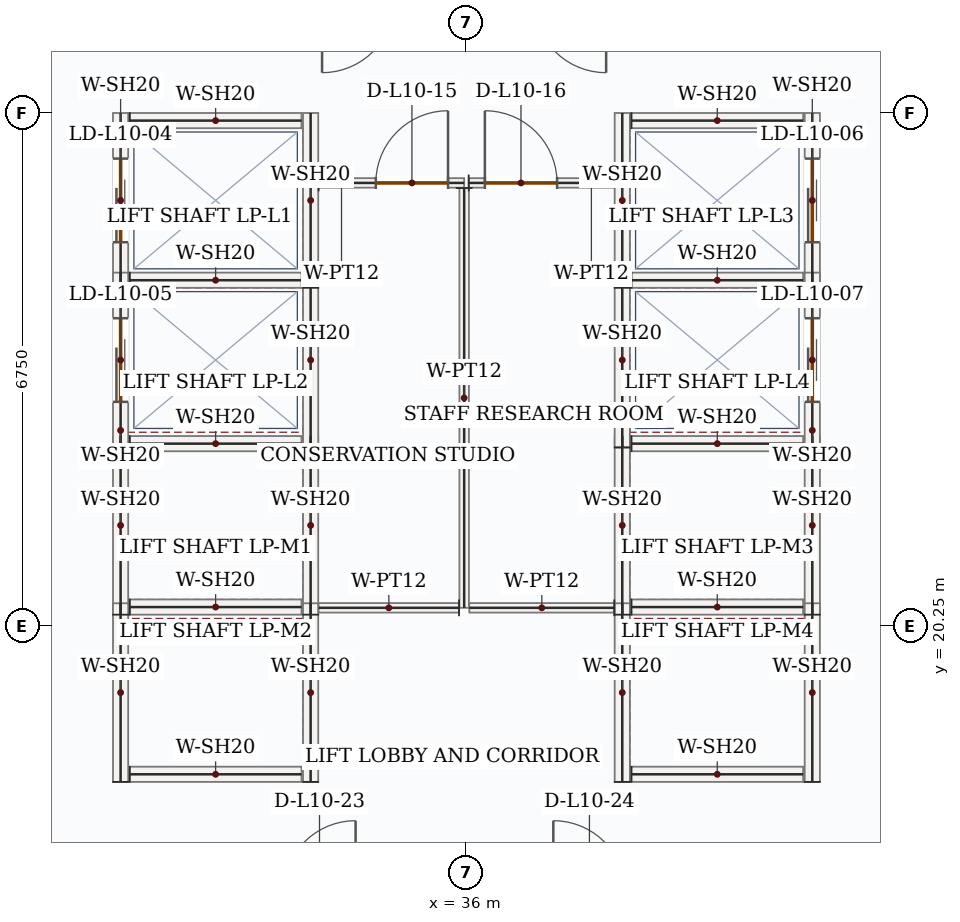
"""IFC4 building model, lengths in metres.
Left out: names, types, materials, properties, quantities, classifications, styles, units other than length and angle.
Written with IfcOpenShell. Run it as: python <this file> out.ifc"""

import sys

from ifc_helpers import new_model, si_unit, direction, frame, frame_2d, origin, place, context, subcontext, project, spatial, rectangle, extrude, source, transform, mapped, element, fill, save


model = new_model("IFC4")
c1 = context("Model", 3, precision=1e-05, world=origin(), true_north=direction((0.0, 1.0)))
c2 = subcontext(c1, "Body", "Model", "MODEL_VIEW")
j1 = project(units=[si_unit("LENGTHUNIT", "METRE"), si_unit("PLANEANGLEUNIT", "RADIAN")], contexts=[c1])
p1 = place(None, origin())
s1 = spatial("IfcSite", under=j1, at=p1, CompositionType="ELEMENT")
p2 = place(p1, origin())
s2 = spatial("IfcBuilding", under=s1, at=p2, CompositionType="ELEMENT")
p3 = place(p2, frame((0.0, 0.0, 50.1)))
s3 = spatial("IfcBuildingStorey", under=s2, at=p3, CompositionType="ELEMENT", Elevation=50.1)
m1 = source(origin(), c2, "Body", "SweptSolid", [
    extrude(rectangle(XDim=2.35, YDim=0.2, at=frame_2d((1.175, 0.0))), origin(), (0.0, 0.0, 1.0), 3.95),
])
for number, where, z_axis, x_axis in (
    (1, (31.45, 20.4, 0.0), (0.0, 0.0, 1.0), (0.0, 1.0, 0.0)),
    (2, (33.95, 20.4, 0.0), (0.0, 0.0, 1.0), (0.0, 1.0, 0.0)),
):
    element("IfcWall", number, at=place(p3, frame(where, z_axis=z_axis, x_axis=x_axis)), inside=s3, PredefinedType="SOLIDWALL", context=c2, shape_type="MappedRepresentation", body=[
        mapped(m1, transform((0.0, 0.0, 0.0), x_axis=(1.0, 0.0, 0.0), y_axis=(0.0, 1.0, 0.0), z_axis=(0.0, 0.0, 1.0), scale=1.0)),
    ])
m2 = source(origin(), c2, "Body", "SweptSolid", [
    extrude(rectangle(XDim=2.26, YDim=0.2, at=frame_2d((1.13, 0.0))), origin(), (0.0, 0.0, 1.0), 3.95),
])
for number, where, z_axis, x_axis in (
    (3, (31.57, 20.5, 0.0), (0.0, 0.0, 1.0), (1.0, 0.0, 0.0)),
    (4, (31.57, 22.65, 0.0), (0.0, 0.0, 1.0), (1.0, 0.0, 0.0)),
):
    element("IfcWall", number, at=place(p3, frame(where, z_axis=z_axis, x_axis=x_axis)), inside=s3, PredefinedType="SOLIDWALL", context=c2, shape_type="MappedRepresentation", body=[
        mapped(m2, transform((0.0, 0.0, 0.0), x_axis=(1.0, 0.0, 0.0), y_axis=(0.0, 1.0, 0.0), z_axis=(0.0, 0.0, 1.0), scale=1.0)),
    ])
for number, where, z_axis, x_axis in (
    (5, (31.45, 18.2, 0.0), (0.0, 0.0, 1.0), (0.0, 1.0, 0.0)),
    (6, (33.95, 18.2, 0.0), (0.0, 0.0, 1.0), (0.0, 1.0, 0.0)),
):
    element("IfcWall", number, at=place(p3, frame(where, z_axis=z_axis, x_axis=x_axis)), inside=s3, PredefinedType="SOLIDWALL", context=c2, shape_type="MappedRepresentation", body=[
        mapped(m1, transform((0.0, 0.0, 0.0), x_axis=(1.0, 0.0, 0.0), y_axis=(0.0, 1.0, 0.0), z_axis=(0.0, 0.0, 1.0), scale=1.0)),
    ])
p4 = place(p3, frame((31.57, 18.3, 0.0), z_axis=(0.0, 0.0, 1.0), x_axis=(1.0, 0.0, 0.0)))
e7 = element("IfcWall", 7, at=p4, inside=s3, PredefinedType="SOLIDWALL", context=c2, shape_type="MappedRepresentation", body=[
    mapped(m2, transform((0.0, 0.0, 0.0), x_axis=(1.0, 0.0, 0.0), y_axis=(0.0, 1.0, 0.0), z_axis=(0.0, 0.0, 1.0), scale=1.0)),
])
for number, where, z_axis, x_axis in (
    (8, (38.05, 20.4, 0.0), (0.0, 0.0, 1.0), (0.0, 1.0, 0.0)),
    (9, (40.55, 20.4, 0.0), (0.0, 0.0, 1.0), (0.0, 1.0, 0.0)),
):
    element("IfcWall", number, at=place(p3, frame(where, z_axis=z_axis, x_axis=x_axis)), inside=s3, PredefinedType="SOLIDWALL", context=c2, shape_type="MappedRepresentation", body=[
        mapped(m1, transform((0.0, 0.0, 0.0), x_axis=(1.0, 0.0, 0.0), y_axis=(0.0, 1.0, 0.0), z_axis=(0.0, 0.0, 1.0), scale=1.0)),
    ])
for number, where, z_axis, x_axis in (
    (10, (38.17, 20.5, 0.0), (0.0, 0.0, 1.0), (1.0, 0.0, 0.0)),
    (11, (38.17, 22.65, 0.0), (0.0, 0.0, 1.0), (1.0, 0.0, 0.0)),
):
    element("IfcWall", number, at=place(p3, frame(where, z_axis=z_axis, x_axis=x_axis)), inside=s3, PredefinedType="SOLIDWALL", context=c2, shape_type="MappedRepresentation", body=[
        mapped(m2, transform((0.0, 0.0, 0.0), x_axis=(1.0, 0.0, 0.0), y_axis=(0.0, 1.0, 0.0), z_axis=(0.0, 0.0, 1.0), scale=1.0)),
    ])
for number, where, z_axis, x_axis in (
    (12, (38.05, 18.2, 0.0), (0.0, 0.0, 1.0), (0.0, 1.0, 0.0)),
    (13, (40.55, 18.2, 0.0), (0.0, 0.0, 1.0), (0.0, 1.0, 0.0)),
):
    element("IfcWall", number, at=place(p3, frame(where, z_axis=z_axis, x_axis=x_axis)), inside=s3, PredefinedType="SOLIDWALL", context=c2, shape_type="MappedRepresentation", body=[
        mapped(m1, transform((0.0, 0.0, 0.0), x_axis=(1.0, 0.0, 0.0), y_axis=(0.0, 1.0, 0.0), z_axis=(0.0, 0.0, 1.0), scale=1.0)),
    ])
p5 = place(p3, frame((38.17, 18.3, 0.0), z_axis=(0.0, 0.0, 1.0), x_axis=(1.0, 0.0, 0.0)))
e14 = element("IfcWall", 14, at=p5, inside=s3, PredefinedType="SOLIDWALL", context=c2, shape_type="MappedRepresentation", body=[
    mapped(m2, transform((0.0, 0.0, 0.0), x_axis=(1.0, 0.0, 0.0), y_axis=(0.0, 1.0, 0.0), z_axis=(0.0, 0.0, 1.0), scale=1.0)),
])
p6 = place(p3, frame((31.45, 24.7, 0.0), z_axis=(0.0, 0.0, 1.0), x_axis=(0.0, 1.0, 0.0)))
e15 = element("IfcWall", 15, at=p6, inside=s3, PredefinedType="SOLIDWALL", context=c2, shape_type="SweptSolid", body=[
    extrude(rectangle(XDim=2.3, YDim=0.2, at=frame_2d((1.15, 0.0))), origin(), (0.0, 0.0, 1.0), 3.95),
])
p7 = place(p6, frame((0.6, 0.0, 0.0)))
e16 = element("IfcOpeningElement", 16, at=p7, cuts=e15, PredefinedType="OPENING", context=c2, shape_type="SweptSolid", body=[
    extrude(rectangle(XDim=1.1, YDim=2.15, at=frame_2d((0.55, 1.075))), frame((0.0, 0.11, 0.0), z_axis=(0.0, -1.0, 0.0), x_axis=(1.0, 0.0, 0.0)), (0.0, 0.0, 1.0), 0.22),
])
m3 = source(origin(), c2, "Body", "SweptSolid", [
    extrude(rectangle(XDim=2.3, YDim=0.2, at=frame_2d((1.15, 0.0))), origin(), (0.0, 0.0, 1.0), 3.95),
])
p8 = place(p3, frame((33.95, 24.7, 0.0), z_axis=(0.0, 0.0, 1.0), x_axis=(0.0, 1.0, 0.0)))
e17 = element("IfcWall", 17, at=p8, inside=s3, PredefinedType="SOLIDWALL", context=c2, shape_type="MappedRepresentation", body=[
    mapped(m3, transform((0.0, 0.0, 0.0), x_axis=(1.0, 0.0, 0.0), y_axis=(0.0, 1.0, 0.0), z_axis=(0.0, 0.0, 1.0), scale=1.0)),
])
for number, where, z_axis, x_axis in (
    (18, (31.57, 24.8, 0.0), (0.0, 0.0, 1.0), (1.0, 0.0, 0.0)),
    (19, (31.57, 26.9, 0.0), (0.0, 0.0, 1.0), (1.0, 0.0, 0.0)),
):
    element("IfcWall", number, at=place(p3, frame(where, z_axis=z_axis, x_axis=x_axis)), inside=s3, PredefinedType="SOLIDWALL", context=c2, shape_type="MappedRepresentation", body=[
        mapped(m2, transform((0.0, 0.0, 0.0), x_axis=(1.0, 0.0, 0.0), y_axis=(0.0, 1.0, 0.0), z_axis=(0.0, 0.0, 1.0), scale=1.0)),
    ])
p9 = place(p3, frame((31.45, 22.6, 0.0), z_axis=(0.0, 0.0, 1.0), x_axis=(0.0, 1.0, 0.0)))
e20 = element("IfcWall", 20, at=p9, inside=s3, PredefinedType="SOLIDWALL", context=c2, shape_type="SweptSolid", body=[
    extrude(rectangle(XDim=2.3, YDim=0.2, at=frame_2d((1.15, 0.0))), origin(), (0.0, 0.0, 1.0), 3.95),
])
p10 = place(p9, frame((0.6, 0.0, 0.0)))
e21 = element("IfcOpeningElement", 21, at=p10, cuts=e20, PredefinedType="OPENING", context=c2, shape_type="SweptSolid", body=[
    extrude(rectangle(XDim=1.1, YDim=2.15, at=frame_2d((0.55, 1.075))), frame((0.0, 0.11, 0.0), z_axis=(0.0, -1.0, 0.0), x_axis=(1.0, 0.0, 0.0)), (0.0, 0.0, 1.0), 0.22),
])
m4 = source(origin(), c2, "Body", "SweptSolid", [
    extrude(rectangle(XDim=2.3, YDim=0.2, at=frame_2d((1.15, 0.0))), origin(), (0.0, 0.0, 1.0), 3.95),
])
p11 = place(p3, frame((33.95, 22.6, 0.0), z_axis=(0.0, 0.0, 1.0), x_axis=(0.0, 1.0, 0.0)))
e22 = element("IfcWall", 22, at=p11, inside=s3, PredefinedType="SOLIDWALL", context=c2, shape_type="MappedRepresentation", body=[
    mapped(m4, transform((0.0, 0.0, 0.0), x_axis=(1.0, 0.0, 0.0), y_axis=(0.0, 1.0, 0.0), z_axis=(0.0, 0.0, 1.0), scale=1.0)),
])
p12 = place(p3, frame((38.05, 24.7, 0.0), z_axis=(0.0, 0.0, 1.0), x_axis=(0.0, 1.0, 0.0)))
e23 = element("IfcWall", 23, at=p12, inside=s3, PredefinedType="SOLIDWALL", context=c2, shape_type="MappedRepresentation", body=[
    mapped(m3, transform((0.0, 0.0, 0.0), x_axis=(1.0, 0.0, 0.0), y_axis=(0.0, 1.0, 0.0), z_axis=(0.0, 0.0, 1.0), scale=1.0)),
])
p13 = place(p3, frame((40.55, 24.7, 0.0), z_axis=(0.0, 0.0, 1.0), x_axis=(0.0, 1.0, 0.0)))
e24 = element("IfcWall", 24, at=p13, inside=s3, PredefinedType="SOLIDWALL", context=c2, shape_type="SweptSolid", body=[
    extrude(rectangle(XDim=2.3, YDim=0.2, at=frame_2d((1.15, 0.0))), origin(), (0.0, 0.0, 1.0), 3.95),
])
p14 = place(p13, frame((0.6, 0.0, 0.0)))
e25 = element("IfcOpeningElement", 25, at=p14, cuts=e24, PredefinedType="OPENING", context=c2, shape_type="SweptSolid", body=[
    extrude(rectangle(XDim=1.1, YDim=2.15, at=frame_2d((0.55, 1.075))), frame((0.0, 0.11, 0.0), z_axis=(0.0, -1.0, 0.0), x_axis=(1.0, 0.0, 0.0)), (0.0, 0.0, 1.0), 0.22),
])
for number, where, z_axis, x_axis in (
    (26, (38.17, 24.8, 0.0), (0.0, 0.0, 1.0), (1.0, 0.0, 0.0)),
    (27, (38.17, 26.9, 0.0), (0.0, 0.0, 1.0), (1.0, 0.0, 0.0)),
):
    element("IfcWall", number, at=place(p3, frame(where, z_axis=z_axis, x_axis=x_axis)), inside=s3, PredefinedType="SOLIDWALL", context=c2, shape_type="MappedRepresentation", body=[
        mapped(m2, transform((0.0, 0.0, 0.0), x_axis=(1.0, 0.0, 0.0), y_axis=(0.0, 1.0, 0.0), z_axis=(0.0, 0.0, 1.0), scale=1.0)),
    ])
p15 = place(p3, frame((38.05, 22.6, 0.0), z_axis=(0.0, 0.0, 1.0), x_axis=(0.0, 1.0, 0.0)))
e28 = element("IfcWall", 28, at=p15, inside=s3, PredefinedType="SOLIDWALL", context=c2, shape_type="MappedRepresentation", body=[
    mapped(m4, transform((0.0, 0.0, 0.0), x_axis=(1.0, 0.0, 0.0), y_axis=(0.0, 1.0, 0.0), z_axis=(0.0, 0.0, 1.0), scale=1.0)),
])
p16 = place(p3, frame((40.55, 22.6, 0.0), z_axis=(0.0, 0.0, 1.0), x_axis=(0.0, 1.0, 0.0)))
e29 = element("IfcWall", 29, at=p16, inside=s3, PredefinedType="SOLIDWALL", context=c2, shape_type="SweptSolid", body=[
    extrude(rectangle(XDim=2.3, YDim=0.2, at=frame_2d((1.15, 0.0))), origin(), (0.0, 0.0, 1.0), 3.95),
])
p17 = place(p16, frame((0.6, 0.0, 0.0)))
e30 = element("IfcOpeningElement", 30, at=p17, cuts=e29, PredefinedType="OPENING", context=c2, shape_type="SweptSolid", body=[
    extrude(rectangle(XDim=1.1, YDim=2.15, at=frame_2d((0.55, 1.075))), frame((0.0, 0.11, 0.0), z_axis=(0.0, -1.0, 0.0), x_axis=(1.0, 0.0, 0.0)), (0.0, 0.0, 1.0), 0.22),
])
p18 = place(p3, frame((34.055, 26.08, 0.0), z_axis=(0.0, 0.0, 1.0), x_axis=(1.0, 0.0, 0.0)))
e31 = element("IfcWall", 31, at=p18, inside=s3, PredefinedType="PARTITIONING", context=c2, shape_type="SweptSolid", body=[
    extrude(rectangle(XDim=1.915, YDim=0.125, at=frame_2d((0.958, 0.0))), origin(), (0.0, 0.0, 1.0), 3.95),
])
p19 = place(p18, frame((0.753, 0.0, 0.0)))
e32 = element("IfcOpeningElement", 32, at=p19, cuts=e31, PredefinedType="OPENING", context=c2, shape_type="SweptSolid", body=[
    extrude(rectangle(XDim=0.95, YDim=2.15, at=frame_2d((0.475, 1.075))), frame((0.0, 0.073, 0.0), z_axis=(0.0, -1.0, 0.0), x_axis=(1.0, 0.0, 0.0)), (0.0, 0.0, 1.0), 0.145),
])
m5 = source(origin(), c2, "Body", "SweptSolid", [
    extrude(rectangle(XDim=5.522, YDim=0.125, at=frame_2d((2.761, 0.0))), origin(), (0.0, 0.0, 1.0), 3.95),
])
p20 = place(p3, frame((35.97, 26.012, 0.0), z_axis=(0.0, 0.0, 1.0), x_axis=(0.0, -1.0, 0.0)))
e33 = element("IfcWall", 33, at=p20, inside=s3, PredefinedType="PARTITIONING", context=c2, shape_type="MappedRepresentation", body=[
    mapped(m5, transform((0.0, 0.0, 0.0), x_axis=(1.0, 0.0, 0.0), y_axis=(0.0, 1.0, 0.0), z_axis=(0.0, 0.0, 1.0), scale=1.0)),
])
m6 = source(origin(), c2, "Body", "SweptSolid", [
    extrude(rectangle(XDim=1.848, YDim=0.125, at=frame_2d((0.924, 0.0))), origin(), (0.0, 0.0, 1.0), 3.95),
])
p21 = place(p3, frame((35.903, 20.49, 0.0), z_axis=(0.0, 0.0, 1.0), x_axis=(-1.0, 0.0, 0.0)))
e34 = element("IfcWall", 34, at=p21, inside=s3, PredefinedType="PARTITIONING", context=c2, shape_type="MappedRepresentation", body=[
    mapped(m6, transform((0.0, 0.0, 0.0), x_axis=(1.0, 0.0, 0.0), y_axis=(0.0, 1.0, 0.0), z_axis=(0.0, 0.0, 1.0), scale=1.0)),
])
p22 = place(p3, frame((36.03, 26.08, 0.0), z_axis=(0.0, 0.0, 1.0), x_axis=(1.0, 0.0, 0.0)))
e35 = element("IfcWall", 35, at=p22, inside=s3, PredefinedType="PARTITIONING", context=c2, shape_type="SweptSolid", body=[
    extrude(rectangle(XDim=1.915, YDim=0.125, at=frame_2d((0.958, 0.0))), origin(), (0.0, 0.0, 1.0), 3.95),
])
p23 = place(p22, frame((0.212, 0.0, 0.0)))
e36 = element("IfcOpeningElement", 36, at=p23, cuts=e35, PredefinedType="OPENING", context=c2, shape_type="SweptSolid", body=[
    extrude(rectangle(XDim=0.95, YDim=2.15, at=frame_2d((0.475, 1.075))), frame((0.0, 0.073, 0.0), z_axis=(0.0, -1.0, 0.0), x_axis=(1.0, 0.0, 0.0)), (0.0, 0.0, 1.0), 0.145),
])
m7 = source(origin(), c2, "Body", "SweptSolid", [
    extrude(rectangle(XDim=1.907, YDim=0.125, at=frame_2d((0.954, 0.0))), origin(), (0.0, 0.0, 1.0), 3.95),
])
p24 = place(p3, frame((37.945, 20.49, 0.0), z_axis=(0.0, 0.0, 1.0), x_axis=(-1.0, 0.0, 0.0)))
e37 = element("IfcWall", 37, at=p24, inside=s3, PredefinedType="PARTITIONING", context=c2, shape_type="MappedRepresentation", body=[
    mapped(m7, transform((0.0, 0.0, 0.0), x_axis=(1.0, 0.0, 0.0), y_axis=(0.0, 1.0, 0.0), z_axis=(0.0, 0.0, 1.0), scale=1.0)),
])
m8 = source(origin(), c2, "Body", "SweptSolid", [
    extrude(rectangle(XDim=1.1, YDim=2.15, at=frame_2d((0.55, 1.075))), frame((0.0, 0.025, 0.0), z_axis=(0.0, -1.0, 0.0), x_axis=(1.0, 0.0, 0.0)), (0.0, 0.0, 1.0), 0.05),
])
p25 = place(p7, origin())
e38 = element("IfcDoor", 38, at=p25, inside=s3, OperationType="DOUBLE_DOOR_SLIDING", PredefinedType="DOOR", context=c2, shape_type="MappedRepresentation", body=[
    mapped(m8, transform((0.0, 0.0, 0.0), x_axis=(1.0, 0.0, 0.0), y_axis=(0.0, 1.0, 0.0), z_axis=(0.0, 0.0, 1.0), scale=1.0)),
])
fill(e16, e38)
p26 = place(p10, origin())
e39 = element("IfcDoor", 39, at=p26, inside=s3, OperationType="DOUBLE_DOOR_SLIDING", PredefinedType="DOOR", context=c2, shape_type="MappedRepresentation", body=[
    mapped(m8, transform((0.0, 0.0, 0.0), x_axis=(1.0, 0.0, 0.0), y_axis=(0.0, 1.0, 0.0), z_axis=(0.0, 0.0, 1.0), scale=1.0)),
])
fill(e21, e39)
p27 = place(p14, origin())
e40 = element("IfcDoor", 40, at=p27, inside=s3, OperationType="DOUBLE_DOOR_SLIDING", PredefinedType="DOOR", context=c2, shape_type="MappedRepresentation", body=[
    mapped(m8, transform((0.0, 0.0, 0.0), x_axis=(1.0, 0.0, 0.0), y_axis=(0.0, 1.0, 0.0), z_axis=(0.0, 0.0, 1.0), scale=1.0)),
])
fill(e25, e40)
p28 = place(p17, origin())
e41 = element("IfcDoor", 41, at=p28, inside=s3, OperationType="DOUBLE_DOOR_SLIDING", PredefinedType="DOOR", context=c2, shape_type="MappedRepresentation", body=[
    mapped(m8, transform((0.0, 0.0, 0.0), x_axis=(1.0, 0.0, 0.0), y_axis=(0.0, 1.0, 0.0), z_axis=(0.0, 0.0, 1.0), scale=1.0)),
])
fill(e30, e41)
m9 = source(origin(), c2, "Body", "SweptSolid", [
    extrude(rectangle(XDim=0.95, YDim=2.15, at=frame_2d((0.475, 1.075))), frame((0.0, 0.025, 0.0), z_axis=(0.0, -1.0, 0.0), x_axis=(1.0, 0.0, 0.0)), (0.0, 0.0, 1.0), 0.05),
])
p29 = place(p19, origin())
e42 = element("IfcDoor", 42, at=p29, inside=s3, OperationType="SINGLE_SWING_RIGHT", PredefinedType="DOOR", context=c2, shape_type="MappedRepresentation", body=[
    mapped(m9, transform((0.0, 0.0, 0.0), x_axis=(1.0, 0.0, 0.0), y_axis=(0.0, 1.0, 0.0), z_axis=(0.0, 0.0, 1.0), scale=1.0)),
])
fill(e32, e42)
p30 = place(p23, origin())
e43 = element("IfcDoor", 43, at=p30, inside=s3, OperationType="SINGLE_SWING_LEFT", PredefinedType="DOOR", context=c2, shape_type="MappedRepresentation", body=[
    mapped(m9, transform((0.0, 0.0, 0.0), x_axis=(1.0, 0.0, 0.0), y_axis=(0.0, 1.0, 0.0), z_axis=(0.0, 0.0, 1.0), scale=1.0)),
])
fill(e36, e43)
save(model, sys.argv[1])
